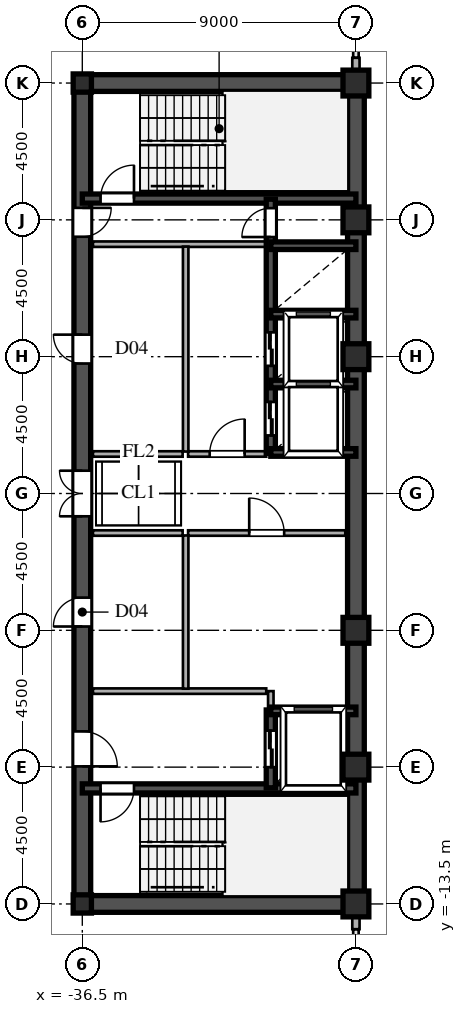
"""IFC4 building model, lengths in metres.
Left out: names, types, materials, properties, quantities, classifications, styles, units other than length and angle.
Written with IfcOpenShell. Run it as: python <this file> out.ifc"""

import sys

from ifc_helpers import new_model, si_unit, direction, frame, frame_2d, origin, origin_2d, place, context, subcontext, project, spatial, rectangle, hollow_rectangle, i_section, extrude, source, transform, mapped, element, fill, save


model = new_model("IFC4")
c1 = context("Model", 3, precision=1e-05, world=origin(), true_north=direction((0.0, 1.0)))
c2 = subcontext(c1, "Body", "Model", "MODEL_VIEW")
j1 = project(units=[si_unit("LENGTHUNIT", "METRE"), si_unit("PLANEANGLEUNIT", "RADIAN")], contexts=[c1])
p1 = place(None, origin())
s1 = spatial("IfcSite", under=j1, at=p1, CompositionType="ELEMENT")
p2 = place(p1, origin())
s2 = spatial("IfcBuilding", under=s1, at=p2, CompositionType="ELEMENT")
p3 = place(p2, frame((0.0, 0.0, 185.1)))
s3 = spatial("IfcBuildingStorey", under=s2, at=p3, CompositionType="ELEMENT", Elevation=185.1)
m1 = source(origin(), c2, "Body", "SweptSolid", [
    extrude(hollow_rectangle(XDim=0.85, YDim=0.85, WallThickness=0.036, at=origin_2d()), origin(), (0.0, 0.0, 1.0), 3.6),
])
for number, where, z_axis, x_axis in (
    (1, (-27.5, -13.5, 0.0), (0.0, 0.0, 1.0), (1.0, 0.0, 0.0)),
    (2, (-27.5, -9.0, 0.0), (0.0, 0.0, 1.0), (1.0, 0.0, 0.0)),
    (3, (-27.5, -4.5, 0.0), (0.0, 0.0, 1.0), (1.0, 0.0, 0.0)),
    (4, (-27.5, 4.5, 0.0), (0.0, 0.0, 1.0), (1.0, 0.0, 0.0)),
    (5, (-27.5, 9.0, 0.0), (0.0, 0.0, 1.0), (1.0, 0.0, 0.0)),
    (6, (-27.5, 13.5, 0.0), (0.0, 0.0, 1.0), (1.0, 0.0, 0.0)),
):
    element("IfcColumn", number, at=place(p3, frame(where, z_axis=z_axis, x_axis=x_axis)), inside=s3, PredefinedType="COLUMN", context=c2, shape_type="MappedRepresentation", body=[
        mapped(m1, transform((0.0, 0.0, 0.0), scale=1.0)),
    ])
m2 = source(origin(), c2, "Body", "SweptSolid", [
    extrude(i_section(OverallWidth=0.6, OverallDepth=0.6, WebThickness=0.025, FlangeThickness=0.04, at=origin_2d()), origin(), (0.0, 0.0, 1.0), 3.6),
])
for number, where, z_axis, x_axis in (
    (7, (-36.5, -13.5, 0.0), (0.0, 0.0, 1.0), (1.0, 0.0, 0.0)),
    (8, (-36.5, 13.5, 0.0), (0.0, 0.0, 1.0), (1.0, 0.0, 0.0)),
):
    element("IfcColumn", number, at=place(p3, frame(where, z_axis=z_axis, x_axis=x_axis)), inside=s3, PredefinedType="COLUMN", context=c2, shape_type="MappedRepresentation", body=[
        mapped(m2, transform((0.0, 0.0, 0.0), scale=1.0)),
    ])
for number, where, z_axis, x_axis in (
    (9, (-27.5, -14.33, 0.0), (0.0, 0.0, 1.0), (0.0, 1.0, 0.0)),
    (10, (-27.5, 13.78, 0.0), (0.0, 0.0, 1.0), (0.0, 1.0, 0.0)),
):
    element("IfcWall", number, at=place(p3, frame(where, z_axis=z_axis, x_axis=x_axis)), inside=s3, PredefinedType="SOLIDWALL", context=c2, shape_type="SweptSolid", body=[
        extrude(rectangle(XDim=0.55, YDim=0.24, at=frame_2d((0.275, 0.0))), origin(), (0.0, 0.0, 1.0), 2.88),
    ])
for number, where, z_axis, x_axis in (
    (11, (-27.5, -13.5, 0.0), (0.0, 0.0, 1.0), (0.0, 1.0, 0.0)),
    (12, (-27.5, 1.3, 0.0), (0.0, 0.0, 1.0), (0.0, 1.0, 0.0)),
):
    element("IfcWall", number, at=place(p3, frame(where, z_axis=z_axis, x_axis=x_axis)), inside=s3, PredefinedType="SHEAR", context=c2, shape_type="SweptSolid", body=[
        extrude(rectangle(XDim=12.2, YDim=0.55, at=frame_2d((6.1, 0.0))), origin(), (0.0, 0.0, 1.0), 3.38),
    ])
p4 = place(p3, frame((-27.5, -1.3, 0.0), z_axis=(0.0, 0.0, 1.0), x_axis=(0.0, 1.0, 0.0)))
e13 = element("IfcWall", 13, at=p4, inside=s3, PredefinedType="SHEAR", context=c2, shape_type="SweptSolid", body=[
    extrude(rectangle(XDim=2.6, YDim=0.55, at=frame_2d((1.3, 0.0))), origin(), (0.0, 0.0, 1.0), 3.38),
])
for number, where, z_axis, x_axis in (
    (14, (-36.5, -13.5, 0.0), (0.0, 0.0, 1.0), (1.0, 0.0, 0.0)),
    (15, (-36.5, 13.5, 0.0), (0.0, 0.0, 1.0), (1.0, 0.0, 0.0)),
):
    element("IfcWall", number, at=place(p3, frame(where, z_axis=z_axis, x_axis=x_axis)), inside=s3, PredefinedType="SHEAR", context=c2, shape_type="SweptSolid", body=[
        extrude(rectangle(XDim=9.0, YDim=0.55, at=frame_2d((4.5, 0.0))), origin(), (0.0, 0.0, 1.0), 3.38),
    ])
p5 = place(p3, frame((-36.5, -13.65, 0.0), z_axis=(0.0, 0.0, 1.0), x_axis=(0.0, 1.0, 0.0)))
e16 = element("IfcWall", 16, at=p5, inside=s3, PredefinedType="SHEAR", context=c2, shape_type="SweptSolid", body=[
    extrude(rectangle(XDim=7.15, YDim=0.55, at=frame_2d((3.575, 0.0))), origin(), (0.0, 0.0, 1.0), 3.38),
])
p6 = place(p5, frame((4.675, 0.0, 0.0)))
e17 = element("IfcOpeningElement", 17, at=p6, cuts=e16, PredefinedType="OPENING", context=c2, shape_type="SweptSolid", body=[
    extrude(rectangle(XDim=1.15, YDim=2.2, at=frame_2d((0.575, 1.1))), frame((0.0, 0.285, 0.0), z_axis=(0.0, -1.0, 0.0), x_axis=(1.0, 0.0, 0.0)), (0.0, 0.0, 1.0), 0.57),
])
p7 = place(p3, frame((-36.5, -1.3, 0.0), z_axis=(0.0, 0.0, 1.0), x_axis=(0.0, 1.0, 0.0)))
e18 = element("IfcWall", 18, at=p7, inside=s3, PredefinedType="SHEAR", context=c2, shape_type="SweptSolid", body=[
    extrude(rectangle(XDim=2.6, YDim=0.55, at=frame_2d((1.3, 0.0))), origin(), (0.0, 0.0, 1.0), 3.38),
])
p8 = place(p7, frame((0.55, 0.0, 0.0)))
e19 = element("IfcOpeningElement", 19, at=p8, cuts=e18, PredefinedType="OPENING", context=c2, shape_type="SweptSolid", body=[
    extrude(rectangle(XDim=1.5, YDim=2.3, at=frame_2d((0.75, 1.15))), frame((0.0, 0.285, 0.0), z_axis=(0.0, -1.0, 0.0), x_axis=(1.0, 0.0, 0.0)), (0.0, 0.0, 1.0), 0.57),
])
p9 = place(p3, frame((-36.5, 8.2, 0.0), z_axis=(0.0, 0.0, 1.0), x_axis=(0.0, 1.0, 0.0)))
e20 = element("IfcWall", 20, at=p9, inside=s3, PredefinedType="SHEAR", context=c2, shape_type="SweptSolid", body=[
    extrude(rectangle(XDim=5.45, YDim=0.55, at=frame_2d((2.725, 0.0))), origin(), (0.0, 0.0, 1.0), 3.38),
])
p10 = place(p9, frame((0.245, 0.0, 0.0)))
e21 = element("IfcOpeningElement", 21, at=p10, cuts=e20, PredefinedType="OPENING", context=c2, shape_type="SweptSolid", body=[
    extrude(rectangle(XDim=0.95, YDim=2.15, at=frame_2d((0.475, 1.075))), frame((0.0, 0.285, 0.0), z_axis=(0.0, -1.0, 0.0), x_axis=(1.0, 0.0, 0.0)), (0.0, 0.0, 1.0), 0.57),
])
p11 = place(p3, frame((-36.5, -6.5, 0.0), z_axis=(0.0, 0.0, 1.0), x_axis=(0.0, 1.0, 0.0)))
e22 = element("IfcWall", 22, at=p11, inside=s3, PredefinedType="SHEAR", context=c2, shape_type="SweptSolid", body=[
    extrude(rectangle(XDim=5.2, YDim=0.55, at=frame_2d((2.6, 0.0))), origin(), (0.0, 0.0, 1.0), 3.38),
])
p12 = place(p11, frame((2.125, 0.0, 0.0)))
e23 = element("IfcOpeningElement", 23, at=p12, cuts=e22, PredefinedType="OPENING", context=c2, shape_type="SweptSolid", body=[
    extrude(rectangle(XDim=0.95, YDim=2.15, at=frame_2d((0.475, 1.075))), frame((0.0, 0.285, 0.0), z_axis=(0.0, -1.0, 0.0), x_axis=(1.0, 0.0, 0.0)), (0.0, 0.0, 1.0), 0.57),
])
p13 = place(p3, frame((-36.5, 1.3, 0.0), z_axis=(0.0, 0.0, 1.0), x_axis=(0.0, 1.0, 0.0)))
e24 = element("IfcWall", 24, at=p13, inside=s3, PredefinedType="SHEAR", context=c2, shape_type="SweptSolid", body=[
    extrude(rectangle(XDim=6.9, YDim=0.55, at=frame_2d((3.45, 0.0))), origin(), (0.0, 0.0, 1.0), 3.38),
])
p14 = place(p13, frame((2.975, 0.0, 0.0)))
e25 = element("IfcOpeningElement", 25, at=p14, cuts=e24, PredefinedType="OPENING", context=c2, shape_type="SweptSolid", body=[
    extrude(rectangle(XDim=0.95, YDim=2.15, at=frame_2d((0.475, 1.075))), frame((0.0, 0.285, 0.0), z_axis=(0.0, -1.0, 0.0), x_axis=(1.0, 0.0, 0.0)), (0.0, 0.0, 1.0), 0.57),
])
p15 = place(p3, frame((-36.5, -9.7, 0.0), z_axis=(0.0, 0.0, 1.0), x_axis=(1.0, 0.0, 0.0)))
e26 = element("IfcWall", 26, at=p15, inside=s3, PredefinedType="SHEAR", context=c2, shape_type="SweptSolid", body=[
    extrude(rectangle(XDim=9.0, YDim=0.3, at=frame_2d((4.5, 0.0))), origin(), (0.0, 0.0, 1.0), 3.38),
])
p16 = place(p15, frame((0.6, 0.0, 0.0)))
e27 = element("IfcOpeningElement", 27, at=p16, cuts=e26, PredefinedType="OPENING", context=c2, shape_type="SweptSolid", body=[
    extrude(rectangle(XDim=1.1, YDim=2.2, at=frame_2d((0.55, 1.1))), frame((0.0, 0.16, 0.0), z_axis=(0.0, -1.0, 0.0), x_axis=(1.0, 0.0, 0.0)), (0.0, 0.0, 1.0), 0.32),
])
p17 = place(p3, frame((-36.5, 9.7, 0.0), z_axis=(0.0, 0.0, 1.0), x_axis=(1.0, 0.0, 0.0)))
e28 = element("IfcWall", 28, at=p17, inside=s3, PredefinedType="SHEAR", context=c2, shape_type="SweptSolid", body=[
    extrude(rectangle(XDim=9.0, YDim=0.3, at=frame_2d((4.5, 0.0))), origin(), (0.0, 0.0, 1.0), 3.38),
])
p18 = place(p17, frame((0.6, 0.0, 0.0)))
e29 = element("IfcOpeningElement", 29, at=p18, cuts=e28, PredefinedType="OPENING", context=c2, shape_type="SweptSolid", body=[
    extrude(rectangle(XDim=1.1, YDim=2.2, at=frame_2d((0.55, 1.1))), frame((0.0, 0.16, 0.0), z_axis=(0.0, -1.0, 0.0), x_axis=(1.0, 0.0, 0.0)), (0.0, 0.0, 1.0), 0.32),
])
for number, where, z_axis, x_axis in (
    (30, (-30.3, -7.15, 0.0), (0.0, 0.0, 1.0), (1.0, 0.0, 0.0)),
    (31, (-30.3, 1.35, 0.0), (0.0, 0.0, 1.0), (1.0, 0.0, 0.0)),
    (32, (-30.3, 3.6, 0.0), (0.0, 0.0, 1.0), (1.0, 0.0, 0.0)),
    (33, (-30.3, 5.9, 0.0), (0.0, 0.0, 1.0), (1.0, 0.0, 0.0)),
    (34, (-30.3, 8.15, 0.0), (0.0, 0.0, 1.0), (1.0, 0.0, 0.0)),
):
    element("IfcWall", number, at=place(p3, frame(where, z_axis=z_axis, x_axis=x_axis)), inside=s3, PredefinedType="SHEAR", context=c2, shape_type="SweptSolid", body=[
        extrude(rectangle(XDim=2.8, YDim=0.25, at=frame_2d((1.4, 0.0))), origin(), (0.0, 0.0, 1.0), 3.38),
    ])
p19 = place(p3, frame((-30.3, -9.68, 0.0), z_axis=(0.0, 0.0, 1.0), x_axis=(0.0, 1.0, 0.0)))
e35 = element("IfcWall", 35, at=p19, inside=s3, PredefinedType="SHEAR", context=c2, shape_type="SweptSolid", body=[
    extrude(rectangle(XDim=2.56, YDim=0.3, at=frame_2d((1.28, 0.0))), origin(), (0.0, 0.0, 1.0), 3.38),
])
p20 = place(p19, frame((0.68, 0.0, 0.0)))
e36 = element("IfcOpeningElement", 36, at=p20, cuts=e35, PredefinedType="OPENING", context=c2, shape_type="SweptSolid", body=[
    extrude(rectangle(XDim=1.2, YDim=2.25, at=frame_2d((0.6, 1.125))), frame((0.0, 0.16, 0.0), z_axis=(0.0, -1.0, 0.0), x_axis=(1.0, 0.0, 0.0)), (0.0, 0.0, 1.0), 0.32),
])
p21 = place(p3, frame((-30.3, 1.32, 0.0), z_axis=(0.0, 0.0, 1.0), x_axis=(0.0, 1.0, 0.0)))
e37 = element("IfcWall", 37, at=p21, inside=s3, PredefinedType="SHEAR", context=c2, shape_type="SweptSolid", body=[
    extrude(rectangle(XDim=2.28, YDim=0.3, at=frame_2d((1.14, 0.0))), origin(), (0.0, 0.0, 1.0), 3.38),
])
p22 = place(p21, frame((0.59, 0.0, 0.0)))
e38 = element("IfcOpeningElement", 38, at=p22, cuts=e37, PredefinedType="OPENING", context=c2, shape_type="SweptSolid", body=[
    extrude(rectangle(XDim=1.1, YDim=2.2, at=frame_2d((0.55, 1.1))), frame((0.0, 0.16, 0.0), z_axis=(0.0, -1.0, 0.0), x_axis=(1.0, 0.0, 0.0)), (0.0, 0.0, 1.0), 0.32),
])
p23 = place(p3, frame((-30.3, 3.6, 0.0), z_axis=(0.0, 0.0, 1.0), x_axis=(0.0, 1.0, 0.0)))
e39 = element("IfcWall", 39, at=p23, inside=s3, PredefinedType="SHEAR", context=c2, shape_type="SweptSolid", body=[
    extrude(rectangle(XDim=2.3, YDim=0.3, at=frame_2d((1.15, 0.0))), origin(), (0.0, 0.0, 1.0), 3.38),
])
p24 = place(p23, frame((0.6, 0.0, 0.0)))
e40 = element("IfcOpeningElement", 40, at=p24, cuts=e39, PredefinedType="OPENING", context=c2, shape_type="SweptSolid", body=[
    extrude(rectangle(XDim=1.1, YDim=2.2, at=frame_2d((0.55, 1.1))), frame((0.0, 0.16, 0.0), z_axis=(0.0, -1.0, 0.0), x_axis=(1.0, 0.0, 0.0)), (0.0, 0.0, 1.0), 0.32),
])
p25 = place(p3, frame((-30.3, 5.9, 0.0), z_axis=(0.0, 0.0, 1.0), x_axis=(0.0, 1.0, 0.0)))
e41 = element("IfcWall", 41, at=p25, inside=s3, PredefinedType="SHEAR", context=c2, shape_type="SweptSolid", body=[
    extrude(rectangle(XDim=2.25, YDim=0.3, at=frame_2d((1.125, 0.0))), origin(), (0.0, 0.0, 1.0), 3.38),
])
p26 = place(p3, frame((-30.3, 8.15, 0.0), z_axis=(0.0, 0.0, 1.0), x_axis=(0.0, 1.0, 0.0)))
e42 = element("IfcWall", 42, at=p26, inside=s3, PredefinedType="SHEAR", context=c2, shape_type="SweptSolid", body=[
    extrude(rectangle(XDim=1.53, YDim=0.3, at=frame_2d((0.765, 0.0))), origin(), (0.0, 0.0, 1.0), 3.38),
])
p27 = place(p26, frame((0.285, 0.0, 0.0)))
e43 = element("IfcOpeningElement", 43, at=p27, cuts=e42, PredefinedType="OPENING", context=c2, shape_type="SweptSolid", body=[
    extrude(rectangle(XDim=0.95, YDim=2.15, at=frame_2d((0.475, 1.075))), frame((0.0, 0.16, 0.0), z_axis=(0.0, -1.0, 0.0), x_axis=(1.0, 0.0, 0.0)), (0.0, 0.0, 1.0), 0.32),
])
p28 = place(p3, frame((-36.15, -6.5, 0.0), z_axis=(0.0, 0.0, 1.0), x_axis=(1.0, 0.0, 0.0)))
e44 = element("IfcWall", 44, at=p28, inside=s3, PredefinedType="PARTITIONING", context=c2, shape_type="SweptSolid", body=[
    extrude(rectangle(XDim=5.7, YDim=0.18, at=frame_2d((2.85, 0.0))), origin(), (0.0, 0.0, 1.0), 3.38),
])
p29 = place(p3, frame((-30.3, -7.12, 0.0), z_axis=(0.0, 0.0, 1.0), x_axis=(0.0, 1.0, 0.0)))
e45 = element("IfcWall", 45, at=p29, inside=s3, PredefinedType="PARTITIONING", context=c2, shape_type="SweptSolid", body=[
    extrude(rectangle(XDim=0.62, YDim=0.18, at=frame_2d((0.31, 0.0))), origin(), (0.0, 0.0, 1.0), 3.38),
])
p30 = place(p3, frame((-36.15, 8.2, 0.0), z_axis=(0.0, 0.0, 1.0), x_axis=(1.0, 0.0, 0.0)))
e46 = element("IfcWall", 46, at=p30, inside=s3, PredefinedType="PARTITIONING", context=c2, shape_type="SweptSolid", body=[
    extrude(rectangle(XDim=5.7, YDim=0.18, at=frame_2d((2.85, 0.0))), origin(), (0.0, 0.0, 1.0), 3.38),
])
p31 = place(p3, frame((-33.1, -6.42, 0.0), z_axis=(0.0, 0.0, 1.0), x_axis=(0.0, 1.0, 0.0)))
e47 = element("IfcWall", 47, at=p31, inside=s3, PredefinedType="PARTITIONING", context=c2, shape_type="SweptSolid", body=[
    extrude(rectangle(XDim=5.04, YDim=0.18, at=frame_2d((2.52, 0.0))), origin(), (0.0, 0.0, 1.0), 3.38),
])
p32 = place(p3, frame((-33.1, 1.38, 0.0), z_axis=(0.0, 0.0, 1.0), x_axis=(0.0, 1.0, 0.0)))
e48 = element("IfcWall", 48, at=p32, inside=s3, PredefinedType="PARTITIONING", context=c2, shape_type="SweptSolid", body=[
    extrude(rectangle(XDim=6.74, YDim=0.18, at=frame_2d((3.37, 0.0))), origin(), (0.0, 0.0, 1.0), 3.38),
])
p33 = place(p3, frame((-33.02, -1.3, 0.0), z_axis=(0.0, 0.0, 1.0), x_axis=(1.0, 0.0, 0.0)))
e49 = element("IfcWall", 49, at=p33, inside=s3, PredefinedType="PARTITIONING", context=c2, shape_type="SweptSolid", body=[
    extrude(rectangle(XDim=5.17, YDim=0.18, at=frame_2d((2.585, 0.0))), origin(), (0.0, 0.0, 1.0), 3.38),
])
p34 = place(p33, frame((2.01, 0.0, 0.0)))
e50 = element("IfcOpeningElement", 50, at=p34, cuts=e49, PredefinedType="OPENING", context=c2, shape_type="SweptSolid", body=[
    extrude(rectangle(XDim=1.15, YDim=2.2, at=frame_2d((0.575, 1.1))), frame((0.0, 0.1, 0.0), z_axis=(0.0, -1.0, 0.0), x_axis=(1.0, 0.0, 0.0)), (0.0, 0.0, 1.0), 0.2),
])
p35 = place(p3, frame((-33.02, 1.3, 0.0), z_axis=(0.0, 0.0, 1.0), x_axis=(1.0, 0.0, 0.0)))
e51 = element("IfcWall", 51, at=p35, inside=s3, PredefinedType="PARTITIONING", context=c2, shape_type="SweptSolid", body=[
    extrude(rectangle(XDim=2.57, YDim=0.18, at=frame_2d((1.285, 0.0))), origin(), (0.0, 0.0, 1.0), 3.38),
])
p36 = place(p35, frame((0.71, 0.0, 0.0)))
e52 = element("IfcOpeningElement", 52, at=p36, cuts=e51, PredefinedType="OPENING", context=c2, shape_type="SweptSolid", body=[
    extrude(rectangle(XDim=1.15, YDim=2.2, at=frame_2d((0.575, 1.1))), frame((0.0, 0.1, 0.0), z_axis=(0.0, -1.0, 0.0), x_axis=(1.0, 0.0, 0.0)), (0.0, 0.0, 1.0), 0.2),
])
for number, where, z_axis, x_axis in (
    (53, (-36.15, -1.3, 0.0), (0.0, 0.0, 1.0), (1.0, 0.0, 0.0)),
    (54, (-36.15, 1.3, 0.0), (0.0, 0.0, 1.0), (1.0, 0.0, 0.0)),
):
    element("IfcWall", number, at=place(p3, frame(where, z_axis=z_axis, x_axis=x_axis)), inside=s3, PredefinedType="PARTITIONING", context=c2, shape_type="SweptSolid", body=[
        extrude(rectangle(XDim=2.95, YDim=0.18, at=frame_2d((1.475, 0.0))), origin(), (0.0, 0.0, 1.0), 3.38),
    ])
m3 = source(origin(), c2, "Body", "SweptSolid", [
    extrude(rectangle(XDim=1.15, YDim=2.2, at=frame_2d((0.575, 1.1))), frame((0.0, 0.025, 0.0), z_axis=(0.0, -1.0, 0.0), x_axis=(1.0, 0.0, 0.0)), (0.0, 0.0, 1.0), 0.05),
])
p37 = place(p6, frame((1.15, 0.0, 0.0), z_axis=(0.0, 0.0, 1.0), x_axis=(-1.0, 0.0, 0.0)))
e55 = element("IfcDoor", 55, at=p37, inside=s3, OperationType="SINGLE_SWING_LEFT", PredefinedType="DOOR", context=c2, shape_type="MappedRepresentation", body=[
    mapped(m3, transform((0.0, 0.0, 0.0), scale=1.0)),
])
fill(e17, e55)
m4 = source(origin(), c2, "Body", "SweptSolid", [
    extrude(rectangle(XDim=1.5, YDim=2.3, at=frame_2d((0.75, 1.15))), frame((0.0, 0.025, 0.0), z_axis=(0.0, -1.0, 0.0), x_axis=(1.0, 0.0, 0.0)), (0.0, 0.0, 1.0), 0.05),
])
p38 = place(p8, origin())
e56 = element("IfcDoor", 56, at=p38, inside=s3, OperationType="DOUBLE_SWING_LEFT", PredefinedType="DOOR", context=c2, shape_type="MappedRepresentation", body=[
    mapped(m4, transform((0.0, 0.0, 0.0), scale=1.0)),
])
fill(e19, e56)
m5 = source(origin(), c2, "Body", "SweptSolid", [
    extrude(rectangle(XDim=0.95, YDim=2.15, at=frame_2d((0.475, 1.075))), frame((0.0, 0.025, 0.0), z_axis=(0.0, -1.0, 0.0), x_axis=(1.0, 0.0, 0.0)), (0.0, 0.0, 1.0), 0.05),
])
p39 = place(p10, frame((0.95, 0.0, 0.0), z_axis=(0.0, 0.0, 1.0), x_axis=(-1.0, 0.0, 0.0)))
e57 = element("IfcDoor", 57, at=p39, inside=s3, OperationType="SINGLE_SWING_RIGHT", PredefinedType="DOOR", context=c2, shape_type="MappedRepresentation", body=[
    mapped(m5, transform((0.0, 0.0, 0.0), scale=1.0)),
])
fill(e21, e57)
p40 = place(p12, origin())
e58 = element("IfcDoor", 58, at=p40, inside=s3, OperationType="SINGLE_SWING_LEFT", PredefinedType="DOOR", context=c2, shape_type="MappedRepresentation", body=[
    mapped(m5, transform((0.0, 0.0, 0.0), scale=1.0)),
])
fill(e23, e58)
p41 = place(p14, origin())
e59 = element("IfcDoor", 59, at=p41, inside=s3, OperationType="SINGLE_SWING_RIGHT", PredefinedType="DOOR", context=c2, shape_type="MappedRepresentation", body=[
    mapped(m5, transform((0.0, 0.0, 0.0), scale=1.0)),
])
fill(e25, e59)
m6 = source(origin(), c2, "Body", "SweptSolid", [
    extrude(rectangle(XDim=1.1, YDim=2.2, at=frame_2d((0.55, 1.1))), frame((0.0, 0.025, 0.0), z_axis=(0.0, -1.0, 0.0), x_axis=(1.0, 0.0, 0.0)), (0.0, 0.0, 1.0), 0.05),
])
p42 = place(p16, frame((1.1, 0.0, 0.0), z_axis=(0.0, 0.0, 1.0), x_axis=(-1.0, 0.0, 0.0)))
e60 = element("IfcDoor", 60, at=p42, inside=s3, OperationType="SINGLE_SWING_LEFT", PredefinedType="DOOR", context=c2, shape_type="MappedRepresentation", body=[
    mapped(m6, transform((0.0, 0.0, 0.0), scale=1.0)),
])
fill(e27, e60)
p43 = place(p18, origin())
e61 = element("IfcDoor", 61, at=p43, inside=s3, OperationType="SINGLE_SWING_RIGHT", PredefinedType="DOOR", context=c2, shape_type="MappedRepresentation", body=[
    mapped(m6, transform((0.0, 0.0, 0.0), scale=1.0)),
])
fill(e29, e61)
m7 = source(origin(), c2, "Body", "SweptSolid", [
    extrude(rectangle(XDim=1.2, YDim=2.25, at=frame_2d((0.6, 1.125))), frame((0.0, 0.025, 0.0), z_axis=(0.0, -1.0, 0.0), x_axis=(1.0, 0.0, 0.0)), (0.0, 0.0, 1.0), 0.05),
])
p44 = place(p20, origin())
e62 = element("IfcDoor", 62, at=p44, inside=s3, OperationType="DOUBLE_DOOR_SLIDING", PredefinedType="DOOR", context=c2, shape_type="MappedRepresentation", body=[
    mapped(m7, transform((0.0, 0.0, 0.0), scale=1.0)),
])
fill(e36, e62)
m8 = source(origin(), c2, "Body", "SweptSolid", [
    extrude(rectangle(XDim=1.1, YDim=2.2, at=frame_2d((0.55, 1.1))), frame((0.0, 0.025, 0.0), z_axis=(0.0, -1.0, 0.0), x_axis=(1.0, 0.0, 0.0)), (0.0, 0.0, 1.0), 0.05),
])
p45 = place(p22, origin())
e63 = element("IfcDoor", 63, at=p45, inside=s3, OperationType="DOUBLE_DOOR_SLIDING", PredefinedType="DOOR", context=c2, shape_type="MappedRepresentation", body=[
    mapped(m8, transform((0.0, 0.0, 0.0), scale=1.0)),
])
fill(e38, e63)
p46 = place(p24, origin())
e64 = element("IfcDoor", 64, at=p46, inside=s3, OperationType="DOUBLE_DOOR_SLIDING", PredefinedType="DOOR", context=c2, shape_type="MappedRepresentation", body=[
    mapped(m8, transform((0.0, 0.0, 0.0), scale=1.0)),
])
fill(e40, e64)
p47 = place(p27, origin())
e65 = element("IfcDoor", 65, at=p47, inside=s3, OperationType="SINGLE_SWING_LEFT", PredefinedType="DOOR", context=c2, shape_type="MappedRepresentation", body=[
    mapped(m5, transform((0.0, 0.0, 0.0), scale=1.0)),
])
fill(e43, e65)
p48 = place(p34, origin())
e66 = element("IfcDoor", 66, at=p48, inside=s3, OperationType="SINGLE_SWING_LEFT", PredefinedType="DOOR", context=c2, shape_type="MappedRepresentation", body=[
    mapped(m3, transform((0.0, 0.0, 0.0), scale=1.0)),
])
fill(e50, e66)
p49 = place(p36, origin())
e67 = element("IfcDoor", 67, at=p49, inside=s3, OperationType="SINGLE_SWING_RIGHT", PredefinedType="DOOR", context=c2, shape_type="MappedRepresentation", body=[
    mapped(m3, transform((0.0, 0.0, 0.0), scale=1.0)),
])
fill(e52, e67)
save(model, sys.argv[1])
